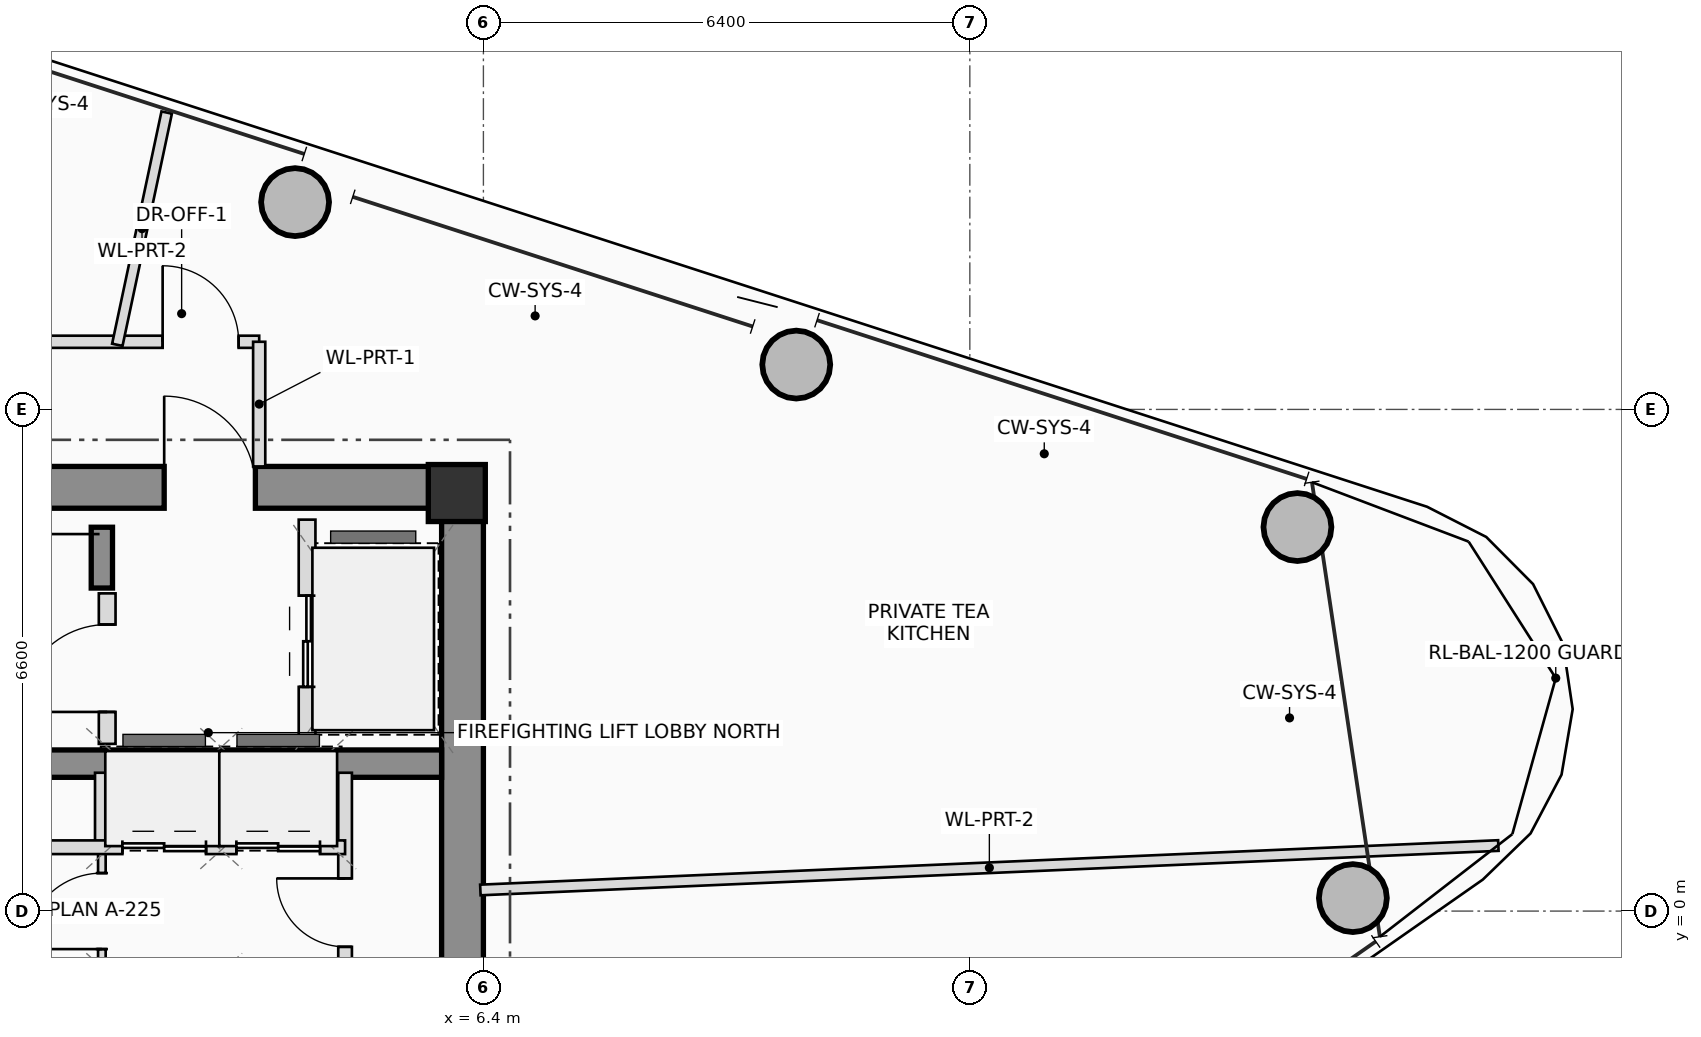
"""IFC4 building model, lengths in metres.
Left out: names, types, materials, properties, quantities, classifications, styles, units other than length and angle.
Written with IfcOpenShell. Run it as: python <this file> out.ifc"""

import sys

from ifc_helpers import new_model, si_unit, direction, frame, frame_2d, origin, origin_2d, place, context, subcontext, project, spatial, rectangle, hollow_circle, extrude, source, transform, mapped, element, fill, save


model = new_model("IFC4")
c1 = context("Model", 3, precision=1e-05, world=origin(), true_north=direction((0.0, 1.0)))
c2 = subcontext(c1, "Body", "Model", "MODEL_VIEW")
j1 = project(units=[si_unit("LENGTHUNIT", "METRE"), si_unit("PLANEANGLEUNIT", "RADIAN")], contexts=[c1])
p1 = place(None, origin())
s1 = spatial("IfcSite", under=j1, at=p1, CompositionType="ELEMENT")
p2 = place(p1, origin())
s2 = spatial("IfcBuilding", under=s1, at=p2, CompositionType="ELEMENT")
p3 = place(p2, frame((0.0, 0.0, 277.95)))
s3 = spatial("IfcBuildingStorey", under=s2, at=p3, CompositionType="ELEMENT", Elevation=277.95)
m1 = source(origin(), c2, "Body", "SweptSolid", [
    extrude(rectangle(XDim=0.75, YDim=0.75, at=origin_2d()), origin(), (0.0, 0.0, 1.0), 3.4),
])
p4 = place(p3, frame((6.05, 5.5, 0.0), z_axis=(0.0, 0.0, 1.0), x_axis=(1.0, 0.0, 0.0)))
e1 = element("IfcColumn", 1, at=p4, inside=s3, PredefinedType="COLUMN", context=c2, shape_type="MappedRepresentation", body=[
    mapped(m1, transform((0.0, 0.0, 0.0), scale=1.0)),
])
p5 = place(p3, frame((-6.4, 5.575, 0.0), z_axis=(0.0, 0.0, 1.0), x_axis=(1.0, 0.0, 0.0)))
e2 = element("IfcWall", 2, at=p5, inside=s3, PredefinedType="SHEAR", context=c2, shape_type="SweptSolid", body=[
    extrude(rectangle(XDim=12.8, YDim=0.55, at=frame_2d((6.4, 0.0))), origin(), (0.0, 0.0, 1.0), 3.4),
])
p6 = place(p5, frame((8.6, 0.0, 0.0)))
e3 = element("IfcOpeningElement", 3, at=p6, cuts=e2, PredefinedType="OPENING", context=c2, shape_type="SweptSolid", body=[
    extrude(rectangle(XDim=1.2, YDim=2.2, at=frame_2d((0.6, 1.1))), frame((0.0, 0.285, 0.0), z_axis=(0.0, -1.0, 0.0), x_axis=(1.0, 0.0, 0.0)), (0.0, 0.0, 1.0), 0.57),
])
p7 = place(p3, frame((6.125, -5.3, 0.0), z_axis=(0.0, 0.0, 1.0), x_axis=(0.0, 1.0, 0.0)))
e4 = element("IfcWall", 4, at=p7, inside=s3, PredefinedType="SHEAR", context=c2, shape_type="SweptSolid", body=[
    extrude(rectangle(XDim=10.6, YDim=0.55, at=frame_2d((5.3, 0.0))), origin(), (0.0, 0.0, 1.0), 3.4),
])
p8 = place(p3, frame((-5.85, 1.94, 0.0), z_axis=(0.0, 0.0, 1.0), x_axis=(1.0, 0.0, 0.0)))
e5 = element("IfcWall", 5, at=p8, inside=s3, PredefinedType="SHEAR", context=c2, shape_type="SweptSolid", body=[
    extrude(rectangle(XDim=11.7, YDim=0.36, at=frame_2d((5.85, 0.0))), origin(), (0.0, 0.0, 1.0), 3.4),
])
p9 = place(p3, frame((1.38, 4.25, 0.0), z_axis=(0.0, 0.0, 1.0), x_axis=(0.0, 1.0, 0.0)))
e6 = element("IfcWall", 6, at=p9, inside=s3, PredefinedType="SHEAR", context=c2, shape_type="SweptSolid", body=[
    extrude(rectangle(XDim=0.8, YDim=0.28, at=frame_2d((0.4, 0.0))), origin(), (0.0, 0.0, 1.0), 3.4),
])
m2 = source(origin(), c2, "Body", "SweptSolid", [
    extrude(hollow_circle(Radius=0.45, WallThickness=0.032, at=origin_2d()), origin(), (0.0, 0.0, 1.0), 3.4),
])
for number, where, z_axis, x_axis in (
    (7, (17.84, 0.171, 0.0), (0.0, 0.0, 1.0), (1.0, 0.0, 0.0)),
    (8, (17.11, 5.052, 0.0), (0.0, 0.0, 1.0), (1.0, 0.0, 0.0)),
    (9, (10.516, 7.19, 0.0), (0.0, 0.0, 1.0), (1.0, 0.0, 0.0)),
    (10, (3.922, 9.327, 0.0), (0.0, 0.0, 1.0), (1.0, 0.0, 0.0)),
):
    element("IfcColumn", number, at=place(p3, frame(where, z_axis=z_axis, x_axis=x_axis)), inside=s3, PredefinedType="COLUMN", context=c2, shape_type="MappedRepresentation", body=[
        mapped(m2, transform((0.0, 0.0, 0.0), scale=1.0)),
    ])
p10 = place(p3, frame((1.45, 2.2, 0.0), z_axis=(0.0, 0.0, 1.0), x_axis=(0.0, 1.0, 0.0)))
e11 = element("IfcWall", 11, at=p10, inside=s3, PredefinedType="PLUMBINGWALL", context=c2, shape_type="SweptSolid", body=[
    extrude(rectangle(XDim=1.98, YDim=0.22, at=frame_2d((0.99, 0.0))), origin(), (0.0, 0.0, 1.0), 3.2),
])
p11 = place(p10, frame((0.42, 0.0, 0.0)))
e12 = element("IfcOpeningElement", 12, at=p11, cuts=e11, PredefinedType="OPENING", context=c2, shape_type="SweptSolid", body=[
    extrude(rectangle(XDim=1.15, YDim=2.15, at=frame_2d((0.575, 1.075))), frame((0.0, 0.12, 0.0), z_axis=(0.0, -1.0, 0.0), x_axis=(1.0, 0.0, 0.0)), (0.0, 0.0, 1.0), 0.24),
])
p12 = place(p3, frame((4.08, 2.2, 0.0), z_axis=(0.0, 0.0, 1.0), x_axis=(0.0, 1.0, 0.0)))
e13 = element("IfcWall", 13, at=p12, inside=s3, PredefinedType="PLUMBINGWALL", context=c2, shape_type="SweptSolid", body=[
    extrude(rectangle(XDim=2.95, YDim=0.22, at=frame_2d((1.475, 0.0))), origin(), (0.0, 0.0, 1.0), 3.2),
])
p13 = place(p12, frame((0.75, 0.0, 0.0)))
e14 = element("IfcOpeningElement", 14, at=p13, cuts=e13, PredefinedType="OPENING", context=c2, shape_type="SweptSolid", body=[
    extrude(rectangle(XDim=1.2, YDim=2.25, at=frame_2d((0.6, 1.125))), frame((0.0, 0.12, 0.0), z_axis=(0.0, -1.0, 0.0), x_axis=(1.0, 0.0, 0.0)), (0.0, 0.0, 1.0), 0.24),
])
p14 = place(p3, frame((1.38, -0.84, 0.0), z_axis=(0.0, 0.0, 1.0), x_axis=(0.0, 1.0, 0.0)))
e15 = element("IfcWall", 15, at=p14, inside=s3, PredefinedType="PARTITIONING", context=c2, shape_type="SweptSolid", body=[
    extrude(rectangle(XDim=1.68, YDim=0.1, at=frame_2d((0.84, 0.0))), origin(), (0.0, 0.0, 1.0), 3.2),
])
p15 = place(p14, frame((0.34, 0.0, 0.0)))
e16 = element("IfcOpeningElement", 16, at=p15, cuts=e15, PredefinedType="OPENING", context=c2, shape_type="SweptSolid", body=[
    extrude(rectangle(XDim=1.0, YDim=2.25, at=frame_2d((0.5, 1.125))), frame((0.0, 0.06, 0.0), z_axis=(0.0, -1.0, 0.0), x_axis=(1.0, 0.0, 0.0)), (0.0, 0.0, 1.0), 0.12),
])
for number, where, z_axis, x_axis in (
    (17, (1.38, 0.84, 0.0), (0.0, 0.0, 1.0), (0.0, 1.0, 0.0)),
    (18, (3.02, 0.84, 0.0), (0.0, 0.0, 1.0), (0.0, 1.0, 0.0)),
    (19, (4.38, 0.84, 0.0), (0.0, 0.0, 1.0), (0.0, 1.0, 0.0)),
):
    element("IfcWall", number, at=place(p3, frame(where, z_axis=z_axis, x_axis=x_axis)), inside=s3, PredefinedType="PLUMBINGWALL", context=c2, shape_type="SweptSolid", body=[
        extrude(rectangle(XDim=0.98, YDim=0.18, at=frame_2d((0.49, 0.0))), origin(), (0.0, 0.0, 1.0), 3.2),
    ])
p16 = place(p3, frame((4.58, -1.82, 0.0), z_axis=(0.0, 0.0, 1.0), x_axis=(0.0, 1.0, 0.0)))
e20 = element("IfcWall", 20, at=p16, inside=s3, PredefinedType="PLUMBINGWALL", context=c2, shape_type="SweptSolid", body=[
    extrude(rectangle(XDim=3.64, YDim=0.18, at=frame_2d((1.82, 0.0))), origin(), (0.0, 0.0, 1.0), 3.2),
])
p17 = place(p16, frame((1.35, 0.0, 0.0)))
e21 = element("IfcOpeningElement", 21, at=p17, cuts=e20, PredefinedType="OPENING", context=c2, shape_type="SweptSolid", body=[
    extrude(rectangle(XDim=0.9, YDim=2.05, at=frame_2d((0.45, 1.025))), frame((0.0, 0.1, 0.0), z_axis=(0.0, -1.0, 0.0), x_axis=(1.0, 0.0, 0.0)), (0.0, 0.0, 1.0), 0.2),
])
p18 = place(p3, frame((-5.68, 0.84, 0.0), z_axis=(0.0, 0.0, 1.0), x_axis=(1.0, 0.0, 0.0)))
e22 = element("IfcWall", 22, at=p18, inside=s3, PredefinedType="PLUMBINGWALL", context=c2, shape_type="SweptSolid", body=[
    extrude(rectangle(XDim=10.26, YDim=0.18, at=frame_2d((5.13, 0.0))), origin(), (0.0, 0.0, 1.0), 3.2),
])
p19 = place(p18, frame((0.91, 0.0, 0.0)))
e23 = element("IfcOpeningElement", 23, at=p19, cuts=e22, PredefinedType="OPENING", context=c2, shape_type="SweptSolid", body=[
    extrude(rectangle(XDim=0.9, YDim=2.05, at=frame_2d((0.45, 1.025))), frame((0.0, 0.1, 0.0), z_axis=(0.0, -1.0, 0.0), x_axis=(1.0, 0.0, 0.0)), (0.0, 0.0, 1.0), 0.2),
])
p20 = place(p18, frame((4.38, 0.0, 0.0)))
e24 = element("IfcOpeningElement", 24, at=p20, cuts=e22, PredefinedType="OPENING", context=c2, shape_type="SweptSolid", body=[
    extrude(rectangle(XDim=0.9, YDim=2.05, at=frame_2d((0.45, 1.025))), frame((0.0, 0.1, 0.0), z_axis=(0.0, -1.0, 0.0), x_axis=(1.0, 0.0, 0.0)), (0.0, 0.0, 1.0), 0.2),
])
p21 = place(p18, frame((7.33, 0.0, 0.0)))
e25 = element("IfcOpeningElement", 25, at=p21, cuts=e22, PredefinedType="OPENING", context=c2, shape_type="SweptSolid", body=[
    extrude(rectangle(XDim=1.1, YDim=2.2, at=frame_2d((0.55, 1.1))), frame((0.0, 0.1, 0.0), z_axis=(0.0, -1.0, 0.0), x_axis=(1.0, 0.0, 0.0)), (0.0, 0.0, 1.0), 0.2),
])
p22 = place(p18, frame((8.83, 0.0, 0.0)))
e26 = element("IfcOpeningElement", 26, at=p22, cuts=e22, PredefinedType="OPENING", context=c2, shape_type="SweptSolid", body=[
    extrude(rectangle(XDim=1.1, YDim=2.2, at=frame_2d((0.55, 1.1))), frame((0.0, 0.1, 0.0), z_axis=(0.0, -1.0, 0.0), x_axis=(1.0, 0.0, 0.0)), (0.0, 0.0, 1.0), 0.2),
])
p23 = place(p3, frame((-6.36, 7.49, 0.0), z_axis=(0.0, 0.0, 1.0), x_axis=(1.0, 0.0, 0.0)))
e27 = element("IfcWall", 27, at=p23, inside=s3, PredefinedType="PARTITIONING", context=c2, shape_type="SweptSolid", body=[
    extrude(rectangle(XDim=9.81, YDim=0.16, at=frame_2d((4.905, 0.0))), origin(), (0.0, 0.0, 1.0), 2.605),
])
p24 = place(p23, frame((4.253, 0.0, 0.0)))
e28 = element("IfcOpeningElement", 28, at=p24, cuts=e27, PredefinedType="OPENING", context=c2, shape_type="SweptSolid", body=[
    extrude(rectangle(XDim=1.0, YDim=2.25, at=frame_2d((0.5, 1.125))), frame((0.0, 0.09, 0.0), z_axis=(0.0, -1.0, 0.0), x_axis=(1.0, 0.0, 0.0)), (0.0, 0.0, 1.0), 0.18),
])
p25 = place(p23, frame((8.54, 0.0, 0.0)))
e29 = element("IfcOpeningElement", 29, at=p25, cuts=e27, PredefinedType="OPENING", context=c2, shape_type="SweptSolid", body=[
    extrude(rectangle(XDim=1.0, YDim=2.25, at=frame_2d((0.5, 1.125))), frame((0.0, 0.09, 0.0), z_axis=(0.0, -1.0, 0.0), x_axis=(1.0, 0.0, 0.0)), (0.0, 0.0, 1.0), 0.18),
])
p26 = place(p3, frame((3.45, 7.49, 0.0), z_axis=(0.0, 0.0, 1.0), x_axis=(0.0, -1.0, 0.0)))
e30 = element("IfcWall", 30, at=p26, inside=s3, PredefinedType="PARTITIONING", context=c2, shape_type="SweptSolid", body=[
    extrude(rectangle(XDim=1.64, YDim=0.16, at=frame_2d((0.82, 0.0))), origin(), (0.0, 0.0, 1.0), 2.805),
])
p27 = place(p3, frame((6.36, 0.278, 0.0), z_axis=(0.0, 0.0, 1.0), x_axis=(0.999047617824, 0.043633213494, 0.0)))
e31 = element("IfcWall", 31, at=p27, inside=s3, PredefinedType="PARTITIONING", context=c2, shape_type="SweptSolid", body=[
    extrude(rectangle(XDim=13.406, YDim=0.14, at=frame_2d((6.703, 0.0))), origin(), (0.0, 0.0, 1.0), 2.605),
])
p28 = place(p3, frame((1.583, 7.45, 0.0), z_axis=(0.0, 0.0, 1.0), x_axis=(0.20788492722, 0.978153289129, 0.0)))
e32 = element("IfcWall", 32, at=p28, inside=s3, PredefinedType="PARTITIONING", context=c2, shape_type="SweptSolid", body=[
    extrude(rectangle(XDim=3.124, YDim=0.14, at=frame_2d((1.562, 0.0))), origin(), (0.0, 0.0, 1.0), 2.765),
])
p29 = place(p6, origin())
e33 = element("IfcDoor", 33, at=p29, inside=s3, OperationType="SINGLE_SWING_LEFT", PredefinedType="DOOR", context=c2, shape_type="SweptSolid", body=[
    extrude(rectangle(XDim=1.2, YDim=2.2, at=frame_2d((0.6, 1.1))), frame((0.0, 0.025, 0.0), z_axis=(0.0, -1.0, 0.0), x_axis=(1.0, 0.0, 0.0)), (0.0, 0.0, 1.0), 0.05),
])
fill(e3, e33)
p30 = place(p11, origin())
e34 = element("IfcDoor", 34, at=p30, inside=s3, OperationType="SINGLE_SWING_LEFT", PredefinedType="DOOR", context=c2, shape_type="SweptSolid", body=[
    extrude(rectangle(XDim=1.15, YDim=2.15, at=frame_2d((0.575, 1.075))), frame((0.0, 0.025, 0.0), z_axis=(0.0, -1.0, 0.0), x_axis=(1.0, 0.0, 0.0)), (0.0, 0.0, 1.0), 0.05),
])
fill(e12, e34)
p31 = place(p13, origin())
e35 = element("IfcDoor", 35, at=p31, inside=s3, OperationType="DOUBLE_DOOR_SLIDING", PredefinedType="DOOR", context=c2, shape_type="SweptSolid", body=[
    extrude(rectangle(XDim=1.2, YDim=2.25, at=frame_2d((0.6, 1.125))), frame((0.0, 0.025, 0.0), z_axis=(0.0, -1.0, 0.0), x_axis=(1.0, 0.0, 0.0)), (0.0, 0.0, 1.0), 0.05),
])
fill(e14, e35)
p32 = place(p15, origin())
e36 = element("IfcDoor", 36, at=p32, inside=s3, OperationType="SINGLE_SWING_LEFT", PredefinedType="DOOR", context=c2, shape_type="SweptSolid", body=[
    extrude(rectangle(XDim=1.0, YDim=2.25, at=frame_2d((0.5, 1.125))), frame((0.0, 0.025, 0.0), z_axis=(0.0, -1.0, 0.0), x_axis=(1.0, 0.0, 0.0)), (0.0, 0.0, 1.0), 0.05),
])
fill(e16, e36)
p33 = place(p17, origin())
e37 = element("IfcDoor", 37, at=p33, inside=s3, OperationType="SINGLE_SWING_RIGHT", PredefinedType="DOOR", context=c2, shape_type="SweptSolid", body=[
    extrude(rectangle(XDim=0.9, YDim=2.05, at=frame_2d((0.45, 1.025))), frame((0.0, 0.025, 0.0), z_axis=(0.0, -1.0, 0.0), x_axis=(1.0, 0.0, 0.0)), (0.0, 0.0, 1.0), 0.05),
])
fill(e21, e37)
p34 = place(p21, origin())
e38 = element("IfcDoor", 38, at=p34, inside=s3, OperationType="DOUBLE_DOOR_SLIDING", PredefinedType="DOOR", context=c2, shape_type="SweptSolid", body=[
    extrude(rectangle(XDim=1.1, YDim=2.2, at=frame_2d((0.55, 1.1))), frame((0.0, 0.025, 0.0), z_axis=(0.0, -1.0, 0.0), x_axis=(1.0, 0.0, 0.0)), (0.0, 0.0, 1.0), 0.05),
])
fill(e25, e38)
p35 = place(p22, origin())
e39 = element("IfcDoor", 39, at=p35, inside=s3, OperationType="DOUBLE_DOOR_SLIDING", PredefinedType="DOOR", context=c2, shape_type="SweptSolid", body=[
    extrude(rectangle(XDim=1.1, YDim=2.2, at=frame_2d((0.55, 1.1))), frame((0.0, 0.025, 0.0), z_axis=(0.0, -1.0, 0.0), x_axis=(1.0, 0.0, 0.0)), (0.0, 0.0, 1.0), 0.05),
])
fill(e26, e39)
p36 = place(p25, origin())
e40 = element("IfcDoor", 40, at=p36, inside=s3, OperationType="SINGLE_SWING_LEFT", PredefinedType="DOOR", context=c2, shape_type="SweptSolid", body=[
    extrude(rectangle(XDim=1.0, YDim=2.25, at=frame_2d((0.5, 1.125))), frame((0.0, 0.025, 0.0), z_axis=(0.0, -1.0, 0.0), x_axis=(1.0, 0.0, 0.0)), (0.0, 0.0, 1.0), 0.05),
])
fill(e29, e40)
save(model, sys.argv[1])
